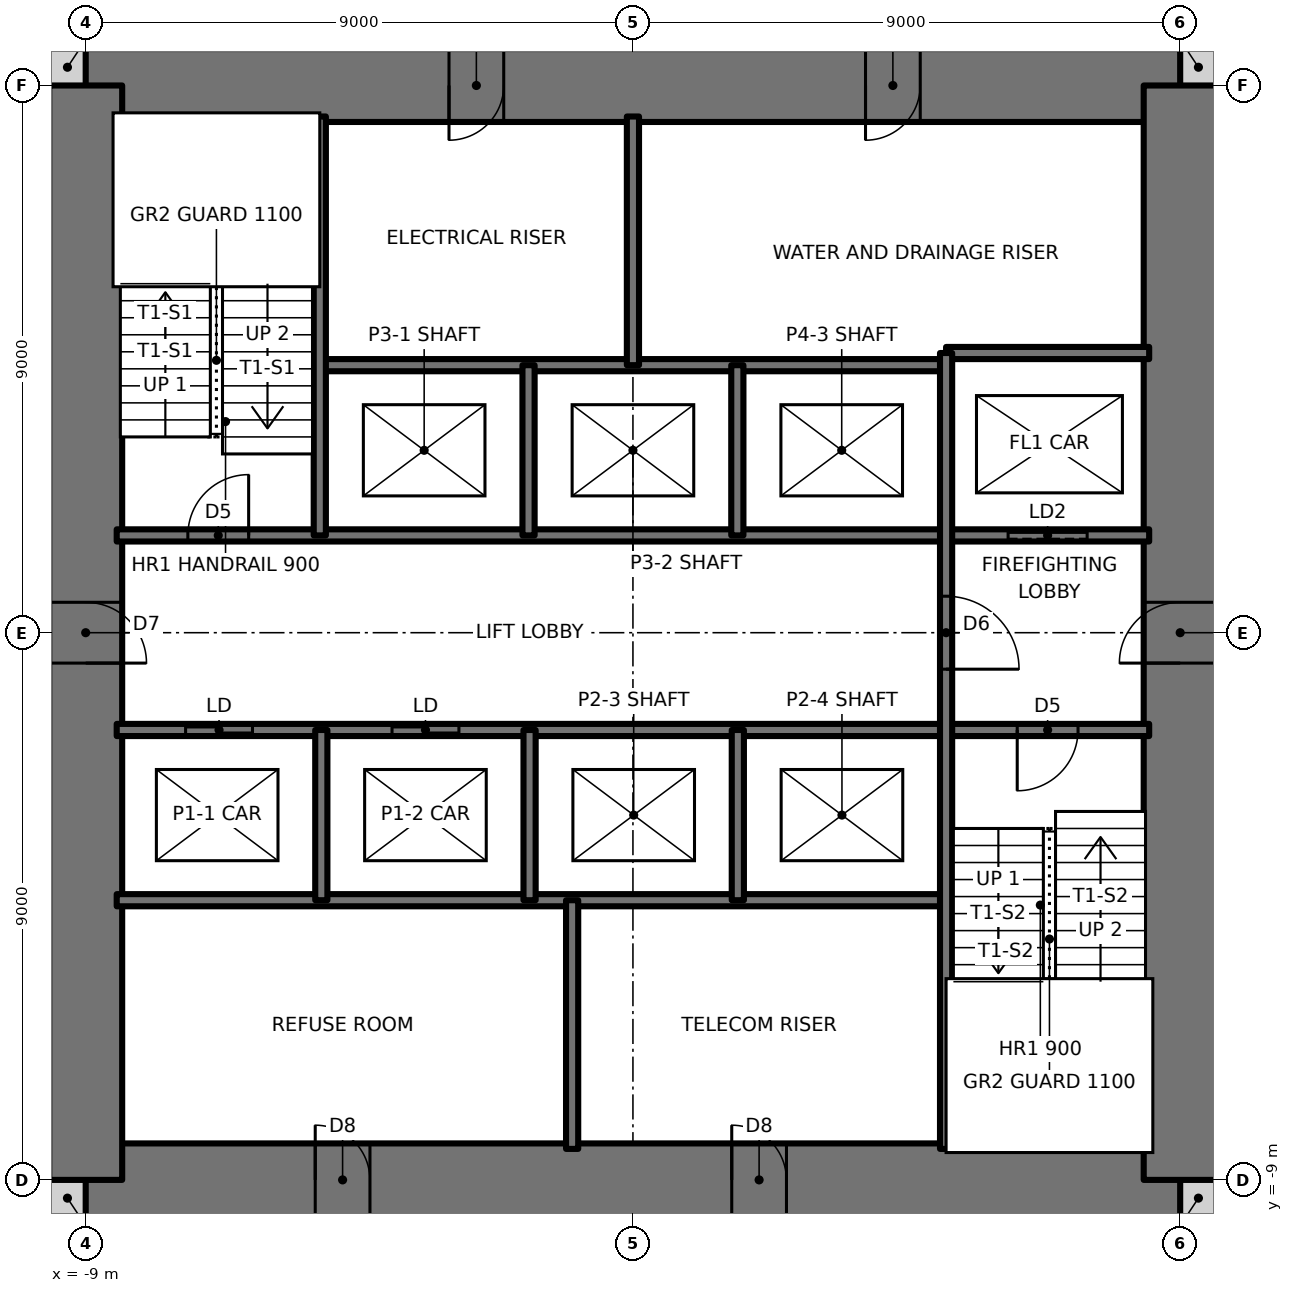
"""IFC4 building model, lengths in metres.
Left out: names, types, materials, properties, quantities, classifications, styles, units other than length and angle.
Written with IfcOpenShell. Run it as: python <this file> out.ifc"""

import sys

from ifc_helpers import new_model, si_unit, direction, frame, frame_2d, origin, place, context, subcontext, project, spatial, rectangle, extrude, element, fill, save


model = new_model("IFC4")
c1 = context("Model", 3, precision=1e-05, world=origin(), true_north=direction((0.0, 1.0)))
c2 = subcontext(c1, "Body", "Model", "MODEL_VIEW")
j1 = project(units=[si_unit("LENGTHUNIT", "METRE"), si_unit("PLANEANGLEUNIT", "RADIAN")], contexts=[c1])
p1 = place(None, origin())
s1 = spatial("IfcSite", under=j1, at=p1, CompositionType="ELEMENT")
p2 = place(p1, origin())
s2 = spatial("IfcBuilding", under=s1, at=p2, CompositionType="ELEMENT")
p3 = place(p2, frame((0.0, 0.0, 25.5)))
s3 = spatial("IfcBuildingStorey", under=s2, at=p3, CompositionType="ELEMENT", Elevation=25.5)
for number, where, z_axis, x_axis in (
    (1, (-9.6, -9.3, 0.0), (0.0, 0.0, 1.0), (1.0, 0.0, 0.0)),
    (2, (9.0, -9.3, 0.0), (0.0, 0.0, 1.0), (1.0, 0.0, 0.0)),
    (3, (9.0, 9.3, 0.0), (0.0, 0.0, 1.0), (1.0, 0.0, 0.0)),
    (4, (-9.6, 9.3, 0.0), (0.0, 0.0, 1.0), (1.0, 0.0, 0.0)),
):
    element("IfcWall", number, at=place(p3, frame(where, z_axis=z_axis, x_axis=x_axis)), inside=s3, PredefinedType="SOLIDWALL", context=c2, shape_type="SweptSolid", body=[
        extrude(rectangle(XDim=0.6, YDim=0.6, at=frame_2d((0.3, 0.0))), origin(), (0.0, 0.0, 1.0), 3.5),
    ])
p4 = place(p3, frame((-9.0, -9.0, 0.0), z_axis=(0.0, 0.0, 1.0), x_axis=(1.0, 0.0, 0.0)))
e5 = element("IfcWall", 5, at=p4, inside=s3, PredefinedType="SHEAR", context=c2, shape_type="SweptSolid", body=[
    extrude(rectangle(XDim=18.0, YDim=1.2, at=frame_2d((9.0, 0.0))), origin(), (0.0, 0.0, 1.0), 3.5),
])
p5 = place(p4, frame((3.775, 0.0, 0.0)))
e6 = element("IfcOpeningElement", 6, at=p5, cuts=e5, PredefinedType="OPENING", context=c2, shape_type="SweptSolid", body=[
    extrude(rectangle(XDim=0.9, YDim=2.1, at=frame_2d((0.45, 1.05))), frame((0.0, 0.61, 0.0), z_axis=(0.0, -1.0, 0.0), x_axis=(1.0, 0.0, 0.0)), (0.0, 0.0, 1.0), 1.22),
])
p6 = place(p4, frame((10.625, 0.0, 0.0)))
e7 = element("IfcOpeningElement", 7, at=p6, cuts=e5, PredefinedType="OPENING", context=c2, shape_type="SweptSolid", body=[
    extrude(rectangle(XDim=0.9, YDim=2.1, at=frame_2d((0.45, 1.05))), frame((0.0, 0.61, 0.0), z_axis=(0.0, -1.0, 0.0), x_axis=(1.0, 0.0, 0.0)), (0.0, 0.0, 1.0), 1.22),
])
p7 = place(p3, frame((9.0, 9.0, 0.0), z_axis=(0.0, 0.0, 1.0), x_axis=(-1.0, 0.0, 0.0)))
e8 = element("IfcWall", 8, at=p7, inside=s3, PredefinedType="SHEAR", context=c2, shape_type="SweptSolid", body=[
    extrude(rectangle(XDim=18.0, YDim=1.2, at=frame_2d((9.0, 0.0))), origin(), (0.0, 0.0, 1.0), 3.5),
])
p8 = place(p7, frame((11.125, 0.0, 0.0)))
e9 = element("IfcOpeningElement", 9, at=p8, cuts=e8, PredefinedType="OPENING", context=c2, shape_type="SweptSolid", body=[
    extrude(rectangle(XDim=0.9, YDim=2.1, at=frame_2d((0.45, 1.05))), frame((0.0, 0.61, 0.0), z_axis=(0.0, -1.0, 0.0), x_axis=(1.0, 0.0, 0.0)), (0.0, 0.0, 1.0), 1.22),
])
p9 = place(p7, frame((4.275, 0.0, 0.0)))
e10 = element("IfcOpeningElement", 10, at=p9, cuts=e8, PredefinedType="OPENING", context=c2, shape_type="SweptSolid", body=[
    extrude(rectangle(XDim=0.9, YDim=2.1, at=frame_2d((0.45, 1.05))), frame((0.0, 0.61, 0.0), z_axis=(0.0, -1.0, 0.0), x_axis=(1.0, 0.0, 0.0)), (0.0, 0.0, 1.0), 1.22),
])
p10 = place(p3, frame((9.0, -9.0, 0.0), z_axis=(0.0, 0.0, 1.0), x_axis=(0.0, 1.0, 0.0)))
e11 = element("IfcWall", 11, at=p10, inside=s3, PredefinedType="SHEAR", context=c2, shape_type="SweptSolid", body=[
    extrude(rectangle(XDim=18.0, YDim=1.2, at=frame_2d((9.0, 0.0))), origin(), (0.0, 0.0, 1.0), 3.5),
])
p11 = place(p10, frame((8.5, 0.0, 0.0)))
e12 = element("IfcOpeningElement", 12, at=p11, cuts=e11, PredefinedType="OPENING", context=c2, shape_type="SweptSolid", body=[
    extrude(rectangle(XDim=1.0, YDim=2.1, at=frame_2d((0.5, 1.05))), frame((0.0, 0.61, 0.0), z_axis=(0.0, -1.0, 0.0), x_axis=(1.0, 0.0, 0.0)), (0.0, 0.0, 1.0), 1.22),
])
p12 = place(p3, frame((-9.0, 9.0, 0.0), z_axis=(0.0, 0.0, 1.0), x_axis=(0.0, -1.0, 0.0)))
e13 = element("IfcWall", 13, at=p12, inside=s3, PredefinedType="SHEAR", context=c2, shape_type="SweptSolid", body=[
    extrude(rectangle(XDim=18.0, YDim=1.2, at=frame_2d((9.0, 0.0))), origin(), (0.0, 0.0, 1.0), 3.5),
])
p13 = place(p12, frame((8.5, 0.0, 0.0)))
e14 = element("IfcOpeningElement", 14, at=p13, cuts=e13, PredefinedType="OPENING", context=c2, shape_type="SweptSolid", body=[
    extrude(rectangle(XDim=1.0, YDim=2.1, at=frame_2d((0.5, 1.05))), frame((0.0, 0.61, 0.0), z_axis=(0.0, -1.0, 0.0), x_axis=(1.0, 0.0, 0.0)), (0.0, 0.0, 1.0), 1.22),
])
p14 = place(p3, frame((-8.49, -4.4, 0.0), z_axis=(0.0, 0.0, 1.0), x_axis=(1.0, 0.0, 0.0)))
e15 = element("IfcWall", 15, at=p14, inside=s3, PredefinedType="SOLIDWALL", context=c2, shape_type="SweptSolid", body=[
    extrude(rectangle(XDim=13.64, YDim=0.2, at=frame_2d((6.82, 0.0))), origin(), (0.0, 0.0, 1.0), 3.5),
])
p15 = place(p3, frame((-8.49, -1.6, 0.0), z_axis=(0.0, 0.0, 1.0), x_axis=(1.0, 0.0, 0.0)))
e16 = element("IfcWall", 16, at=p15, inside=s3, PredefinedType="SOLIDWALL", context=c2, shape_type="SweptSolid", body=[
    extrude(rectangle(XDim=16.98, YDim=0.2, at=frame_2d((8.49, 0.0))), origin(), (0.0, 0.0, 1.0), 3.5),
])
p16 = place(p15, frame((14.81, 0.0, 0.0)))
e17 = element("IfcOpeningElement", 17, at=p16, cuts=e16, PredefinedType="OPENING", context=c2, shape_type="SweptSolid", body=[
    extrude(rectangle(XDim=1.0, YDim=2.1, at=frame_2d((0.5, 1.05))), frame((0.0, 0.11, 0.0), z_axis=(0.0, -1.0, 0.0), x_axis=(1.0, 0.0, 0.0)), (0.0, 0.0, 1.0), 0.22),
])
p17 = place(p15, frame((1.133, 0.0, 0.0)))
e18 = element("IfcOpeningElement", 18, at=p17, cuts=e16, PredefinedType="OPENING", context=c2, shape_type="SweptSolid", body=[
    extrude(rectangle(XDim=1.1, YDim=2.1, at=frame_2d((0.55, 1.05))), frame((0.0, 0.11, 0.0), z_axis=(0.0, -1.0, 0.0), x_axis=(1.0, 0.0, 0.0)), (0.0, 0.0, 1.0), 0.22),
])
p18 = place(p15, frame((4.528, 0.0, 0.0)))
e19 = element("IfcOpeningElement", 19, at=p18, cuts=e16, PredefinedType="OPENING", context=c2, shape_type="SweptSolid", body=[
    extrude(rectangle(XDim=1.1, YDim=2.1, at=frame_2d((0.55, 1.05))), frame((0.0, 0.11, 0.0), z_axis=(0.0, -1.0, 0.0), x_axis=(1.0, 0.0, 0.0)), (0.0, 0.0, 1.0), 0.22),
])
p19 = place(p3, frame((-8.49, 1.6, 0.0), z_axis=(0.0, 0.0, 1.0), x_axis=(1.0, 0.0, 0.0)))
e20 = element("IfcWall", 20, at=p19, inside=s3, PredefinedType="SOLIDWALL", context=c2, shape_type="SweptSolid", body=[
    extrude(rectangle(XDim=16.98, YDim=0.2, at=frame_2d((8.49, 0.0))), origin(), (0.0, 0.0, 1.0), 3.5),
])
p20 = place(p19, frame((1.17, 0.0, 0.0)))
e21 = element("IfcOpeningElement", 21, at=p20, cuts=e20, PredefinedType="OPENING", context=c2, shape_type="SweptSolid", body=[
    extrude(rectangle(XDim=1.0, YDim=2.1, at=frame_2d((0.5, 1.05))), frame((0.0, 0.11, 0.0), z_axis=(0.0, -1.0, 0.0), x_axis=(1.0, 0.0, 0.0)), (0.0, 0.0, 1.0), 0.22),
])
p21 = place(p19, frame((14.66, 0.0, 0.0)))
e22 = element("IfcOpeningElement", 22, at=p21, cuts=e20, PredefinedType="OPENING", context=c2, shape_type="SweptSolid", body=[
    extrude(rectangle(XDim=1.3, YDim=2.1, at=frame_2d((0.65, 1.05))), frame((0.0, 0.11, 0.0), z_axis=(0.0, -1.0, 0.0), x_axis=(1.0, 0.0, 0.0)), (0.0, 0.0, 1.0), 0.22),
])
p22 = place(p3, frame((-5.15, 4.4, 0.0), z_axis=(0.0, 0.0, 1.0), x_axis=(1.0, 0.0, 0.0)))
e23 = element("IfcWall", 23, at=p22, inside=s3, PredefinedType="SOLIDWALL", context=c2, shape_type="SweptSolid", body=[
    extrude(rectangle(XDim=10.3, YDim=0.2, at=frame_2d((5.15, 0.0))), origin(), (0.0, 0.0, 1.0), 3.5),
])
p23 = place(p3, frame((5.15, 4.6, 0.0), z_axis=(0.0, 0.0, 1.0), x_axis=(1.0, 0.0, 0.0)))
e24 = element("IfcWall", 24, at=p23, inside=s3, PredefinedType="SOLIDWALL", context=c2, shape_type="SweptSolid", body=[
    extrude(rectangle(XDim=3.34, YDim=0.2, at=frame_2d((1.67, 0.0))), origin(), (0.0, 0.0, 1.0), 3.5),
])
p24 = place(p3, frame((5.15, -8.49, 0.0), z_axis=(0.0, 0.0, 1.0), x_axis=(0.0, 1.0, 0.0)))
e25 = element("IfcWall", 25, at=p24, inside=s3, PredefinedType="SOLIDWALL", context=c2, shape_type="SweptSolid", body=[
    extrude(rectangle(XDim=13.09, YDim=0.2, at=frame_2d((6.545, 0.0))), origin(), (0.0, 0.0, 1.0), 3.5),
])
p25 = place(p24, frame((7.89, 0.0, 0.0)))
e26 = element("IfcOpeningElement", 26, at=p25, cuts=e25, PredefinedType="OPENING", context=c2, shape_type="SweptSolid", body=[
    extrude(rectangle(XDim=1.2, YDim=2.1, at=frame_2d((0.6, 1.05))), frame((0.0, 0.11, 0.0), z_axis=(0.0, -1.0, 0.0), x_axis=(1.0, 0.0, 0.0)), (0.0, 0.0, 1.0), 0.22),
])
for number, where, z_axis, x_axis in (
    (27, (1.725, -4.4, 0.0), (0.0, 0.0, 1.0), (0.0, 1.0, 0.0)),
    (28, (1.717, 1.6, 0.0), (0.0, 0.0, 1.0), (0.0, 1.0, 0.0)),
):
    element("IfcWall", number, at=place(p3, frame(where, z_axis=z_axis, x_axis=x_axis)), inside=s3, PredefinedType="SOLIDWALL", context=c2, shape_type="SweptSolid", body=[
        extrude(rectangle(XDim=2.8, YDim=0.2, at=frame_2d((1.4, 0.0))), origin(), (0.0, 0.0, 1.0), 3.5),
    ])
for number, where, z_axis, x_axis in (
    (29, (0.0, 4.4, 0.0), (0.0, 0.0, 1.0), (0.0, 1.0, 0.0)),
    (30, (-1.0, -8.49, 0.0), (0.0, 0.0, 1.0), (0.0, 1.0, 0.0)),
):
    element("IfcWall", number, at=place(p3, frame(where, z_axis=z_axis, x_axis=x_axis)), inside=s3, PredefinedType="SOLIDWALL", context=c2, shape_type="SweptSolid", body=[
        extrude(rectangle(XDim=4.09, YDim=0.2, at=frame_2d((2.045, 0.0))), origin(), (0.0, 0.0, 1.0), 3.5),
    ])
for number, where, z_axis, x_axis in (
    (31, (-1.7, -4.4, 0.0), (0.0, 0.0, 1.0), (0.0, 1.0, 0.0)),
    (32, (-1.717, 1.6, 0.0), (0.0, 0.0, 1.0), (0.0, 1.0, 0.0)),
    (33, (-5.125, -4.4, 0.0), (0.0, 0.0, 1.0), (0.0, 1.0, 0.0)),
):
    element("IfcWall", number, at=place(p3, frame(where, z_axis=z_axis, x_axis=x_axis)), inside=s3, PredefinedType="SOLIDWALL", context=c2, shape_type="SweptSolid", body=[
        extrude(rectangle(XDim=2.8, YDim=0.2, at=frame_2d((1.4, 0.0))), origin(), (0.0, 0.0, 1.0), 3.5),
    ])
p26 = place(p3, frame((-5.15, 1.6, 0.0), z_axis=(0.0, 0.0, 1.0), x_axis=(0.0, 1.0, 0.0)))
e34 = element("IfcWall", 34, at=p26, inside=s3, PredefinedType="SOLIDWALL", context=c2, shape_type="SweptSolid", body=[
    extrude(rectangle(XDim=6.89, YDim=0.2, at=frame_2d((3.445, 0.0))), origin(), (0.0, 0.0, 1.0), 3.5),
])
p27 = place(p20, origin())
e35 = element("IfcDoor", 35, at=p27, inside=s3, OperationType="SINGLE_SWING_RIGHT", PredefinedType="DOOR", context=c2, shape_type="SweptSolid", body=[
    extrude(rectangle(XDim=1.0, YDim=2.1, at=frame_2d((0.5, 1.05))), frame((0.0, 0.025, 0.0), z_axis=(0.0, -1.0, 0.0), x_axis=(1.0, 0.0, 0.0)), (0.0, 0.0, 1.0), 0.05),
])
fill(e21, e35)
p28 = place(p16, frame((1.0, 0.0, 0.0), z_axis=(0.0, 0.0, 1.0), x_axis=(-1.0, 0.0, 0.0)))
e36 = element("IfcDoor", 36, at=p28, inside=s3, OperationType="SINGLE_SWING_RIGHT", PredefinedType="DOOR", context=c2, shape_type="SweptSolid", body=[
    extrude(rectangle(XDim=1.0, YDim=2.1, at=frame_2d((0.5, 1.05))), frame((0.0, 0.025, 0.0), z_axis=(0.0, -1.0, 0.0), x_axis=(1.0, 0.0, 0.0)), (0.0, 0.0, 1.0), 0.05),
])
fill(e17, e36)
p29 = place(p25, frame((1.2, 0.0, 0.0), z_axis=(0.0, 0.0, 1.0), x_axis=(-1.0, 0.0, 0.0)))
e37 = element("IfcDoor", 37, at=p29, inside=s3, OperationType="SINGLE_SWING_RIGHT", PredefinedType="DOOR", context=c2, shape_type="SweptSolid", body=[
    extrude(rectangle(XDim=1.2, YDim=2.1, at=frame_2d((0.6, 1.05))), frame((0.0, 0.025, 0.0), z_axis=(0.0, -1.0, 0.0), x_axis=(1.0, 0.0, 0.0)), (0.0, 0.0, 1.0), 0.05),
])
fill(e26, e37)
p30 = place(p13, origin())
e38 = element("IfcDoor", 38, at=p30, inside=s3, OperationType="SINGLE_SWING_RIGHT", PredefinedType="DOOR", context=c2, shape_type="SweptSolid", body=[
    extrude(rectangle(XDim=1.0, YDim=2.1, at=frame_2d((0.5, 1.05))), frame((0.0, 0.025, 0.0), z_axis=(0.0, -1.0, 0.0), x_axis=(1.0, 0.0, 0.0)), (0.0, 0.0, 1.0), 0.05),
])
fill(e14, e38)
p31 = place(p11, origin())
e39 = element("IfcDoor", 39, at=p31, inside=s3, OperationType="SINGLE_SWING_LEFT", PredefinedType="DOOR", context=c2, shape_type="SweptSolid", body=[
    extrude(rectangle(XDim=1.0, YDim=2.1, at=frame_2d((0.5, 1.05))), frame((0.0, 0.025, 0.0), z_axis=(0.0, -1.0, 0.0), x_axis=(1.0, 0.0, 0.0)), (0.0, 0.0, 1.0), 0.05),
])
fill(e12, e39)
p32 = place(p8, origin())
e40 = element("IfcDoor", 40, at=p32, inside=s3, OperationType="SINGLE_SWING_RIGHT", PredefinedType="DOOR", context=c2, shape_type="SweptSolid", body=[
    extrude(rectangle(XDim=0.9, YDim=2.1, at=frame_2d((0.45, 1.05))), frame((0.0, 0.025, 0.0), z_axis=(0.0, -1.0, 0.0), x_axis=(1.0, 0.0, 0.0)), (0.0, 0.0, 1.0), 0.05),
])
fill(e9, e40)
p33 = place(p9, origin())
e41 = element("IfcDoor", 41, at=p33, inside=s3, OperationType="SINGLE_SWING_RIGHT", PredefinedType="DOOR", context=c2, shape_type="SweptSolid", body=[
    extrude(rectangle(XDim=0.9, YDim=2.1, at=frame_2d((0.45, 1.05))), frame((0.0, 0.025, 0.0), z_axis=(0.0, -1.0, 0.0), x_axis=(1.0, 0.0, 0.0)), (0.0, 0.0, 1.0), 0.05),
])
fill(e10, e41)
p34 = place(p5, origin())
e42 = element("IfcDoor", 42, at=p34, inside=s3, OperationType="SINGLE_SWING_LEFT", PredefinedType="DOOR", context=c2, shape_type="SweptSolid", body=[
    extrude(rectangle(XDim=0.9, YDim=2.1, at=frame_2d((0.45, 1.05))), frame((0.0, 0.025, 0.0), z_axis=(0.0, -1.0, 0.0), x_axis=(1.0, 0.0, 0.0)), (0.0, 0.0, 1.0), 0.05),
])
fill(e6, e42)
p35 = place(p6, origin())
e43 = element("IfcDoor", 43, at=p35, inside=s3, OperationType="SINGLE_SWING_LEFT", PredefinedType="DOOR", context=c2, shape_type="SweptSolid", body=[
    extrude(rectangle(XDim=0.9, YDim=2.1, at=frame_2d((0.45, 1.05))), frame((0.0, 0.025, 0.0), z_axis=(0.0, -1.0, 0.0), x_axis=(1.0, 0.0, 0.0)), (0.0, 0.0, 1.0), 0.05),
])
fill(e7, e43)
p36 = place(p17, origin())
e44 = element("IfcDoor", 44, at=p36, inside=s3, OperationType="DOUBLE_DOOR_SLIDING", PredefinedType="DOOR", context=c2, shape_type="SweptSolid", body=[
    extrude(rectangle(XDim=1.1, YDim=2.1, at=frame_2d((0.55, 1.05))), frame((0.0, 0.025, 0.0), z_axis=(0.0, -1.0, 0.0), x_axis=(1.0, 0.0, 0.0)), (0.0, 0.0, 1.0), 0.05),
])
fill(e18, e44)
p37 = place(p18, origin())
e45 = element("IfcDoor", 45, at=p37, inside=s3, OperationType="DOUBLE_DOOR_SLIDING", PredefinedType="DOOR", context=c2, shape_type="SweptSolid", body=[
    extrude(rectangle(XDim=1.1, YDim=2.1, at=frame_2d((0.55, 1.05))), frame((0.0, 0.025, 0.0), z_axis=(0.0, -1.0, 0.0), x_axis=(1.0, 0.0, 0.0)), (0.0, 0.0, 1.0), 0.05),
])
fill(e19, e45)
p38 = place(p21, origin())
e46 = element("IfcDoor", 46, at=p38, inside=s3, OperationType="SLIDING_TO_LEFT", PredefinedType="DOOR", context=c2, shape_type="SweptSolid", body=[
    extrude(rectangle(XDim=1.3, YDim=2.1, at=frame_2d((0.65, 1.05))), frame((0.0, 0.025, 0.0), z_axis=(0.0, -1.0, 0.0), x_axis=(1.0, 0.0, 0.0)), (0.0, 0.0, 1.0), 0.05),
])
fill(e22, e46)
save(model, sys.argv[1])
